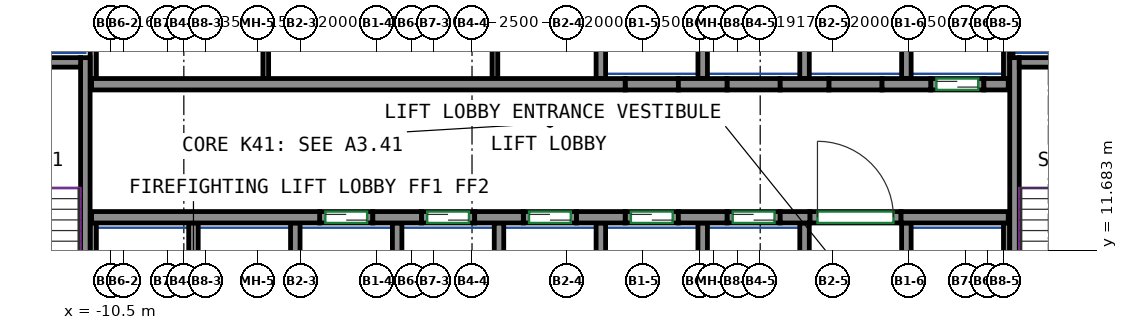
"""IFC4 building model, lengths in metres.
Left out: names, types, materials, properties, quantities, classifications, styles, units other than length and angle.
Written with IfcOpenShell. Run it as: python <this file> out.ifc"""

import sys

from ifc_helpers import new_model, si_unit, direction, frame, frame_2d, origin, place, context, subcontext, project, spatial, rectangle, extrude, source, transform, mapped, element, fill, save


model = new_model("IFC4")
c1 = context("Model", 3, precision=1e-05, world=origin(), true_north=direction((0.0, 1.0)))
c2 = subcontext(c1, "Body", "Model", "MODEL_VIEW")
j1 = project(units=[si_unit("LENGTHUNIT", "METRE"), si_unit("PLANEANGLEUNIT", "RADIAN")], contexts=[c1])
p1 = place(None, origin())
s1 = spatial("IfcSite", under=j1, at=p1, CompositionType="ELEMENT")
p2 = place(p1, origin())
s2 = spatial("IfcBuilding", under=s1, at=p2, CompositionType="ELEMENT")
p3 = place(p2, frame((0.0, 0.0, 171.9)))
s3 = spatial("IfcBuildingStorey", under=s2, at=p3, CompositionType="ELEMENT", Elevation=171.9)
m1 = source(origin(), c2, "Body", "SweptSolid", [
    extrude(rectangle(XDim=7.75, YDim=0.25, at=frame_2d((3.875, 0.0))), origin(), (0.0, 0.0, 1.0), 3.12),
])
p4 = place(p3, frame((-11.175, 9.0, 0.0), z_axis=(0.0, 0.0, 1.0), x_axis=(0.0, 1.0, 0.0)))
e1 = element("IfcWall", 1, at=p4, inside=s3, PredefinedType="SHEAR", context=c2, shape_type="MappedRepresentation", body=[
    mapped(m1, transform((0.0, 0.0, 0.0))),
])
m2 = source(origin(), c2, "Body", "SweptSolid", [
    extrude(rectangle(XDim=3.7, YDim=0.25, at=frame_2d((1.85, 0.0))), origin(), (0.0, 0.0, 1.0), 3.12),
])
p5 = place(p3, frame((-15.0, 16.625, 0.0), z_axis=(0.0, 0.0, 1.0), x_axis=(1.0, 0.0, 0.0)))
e2 = element("IfcWall", 2, at=p5, inside=s3, PredefinedType="SHEAR", context=c2, shape_type="MappedRepresentation", body=[
    mapped(m2, transform((0.0, 0.0, 0.0))),
])
p6 = place(p3, frame((13.275, 9.0, 0.0), z_axis=(0.0, 0.0, 1.0), x_axis=(0.0, 1.0, 0.0)))
e3 = element("IfcWall", 3, at=p6, inside=s3, PredefinedType="SHEAR", context=c2, shape_type="MappedRepresentation", body=[
    mapped(m1, transform((0.0, 0.0, 0.0))),
])
m3 = source(origin(), c2, "Body", "SweptSolid", [
    extrude(rectangle(XDim=3.7, YDim=0.25, at=frame_2d((1.85, 0.0))), origin(), (0.0, 0.0, 1.0), 3.12),
])
p7 = place(p3, frame((13.4, 16.625, 0.0), z_axis=(0.0, 0.0, 1.0), x_axis=(1.0, 0.0, 0.0)))
e4 = element("IfcWall", 4, at=p7, inside=s3, PredefinedType="SHEAR", context=c2, shape_type="MappedRepresentation", body=[
    mapped(m3, transform((0.0, 0.0, 0.0))),
])
m4 = source(origin(), c2, "Body", "SweptSolid", [
    extrude(rectangle(XDim=6.0, YDim=0.3, at=frame_2d((3.0, 0.0))), origin(), (0.0, 0.0, 1.0), 3.12),
])
p8 = place(p3, frame((-11.01, 12.55, 0.0), z_axis=(0.0, 0.0, 1.0), x_axis=(1.0, 0.0, 0.0)))
e5 = element("IfcWall", 5, at=p8, inside=s3, PredefinedType="SHEAR", context=c2, shape_type="MappedRepresentation", body=[
    mapped(m4, transform((0.0, 0.0, 0.0))),
])
m5 = source(origin(), c2, "Body", "SweptSolid", [
    extrude(rectangle(XDim=1.28, YDim=0.3, at=frame_2d((0.64, 0.0))), origin(), (0.0, 0.0, 1.0), 3.12),
])
for number, where, z_axis, x_axis in (
    (6, (-3.61, 12.55, 0.0), (0.0, 0.0, 1.0), (1.0, 0.0, 0.0)),
    (7, (-0.93, 12.55, 0.0), (0.0, 0.0, 1.0), (1.0, 0.0, 0.0)),
    (8, (1.75, 12.55, 0.0), (0.0, 0.0, 1.0), (1.0, 0.0, 0.0)),
    (9, (4.43, 12.55, 0.0), (0.0, 0.0, 1.0), (1.0, 0.0, 0.0)),
):
    element("IfcWall", number, at=place(p3, frame(where, z_axis=z_axis, x_axis=x_axis)), inside=s3, PredefinedType="SHEAR", context=c2, shape_type="MappedRepresentation", body=[
        mapped(m5, transform((0.0, 0.0, 0.0))),
    ])
m6 = source(origin(), c2, "Body", "SweptSolid", [
    extrude(rectangle(XDim=0.78, YDim=0.3, at=frame_2d((0.39, 0.0))), origin(), (0.0, 0.0, 1.0), 3.12),
])
p9 = place(p3, frame((7.11, 12.55, 0.0), z_axis=(0.0, 0.0, 1.0), x_axis=(1.0, 0.0, 0.0)))
e10 = element("IfcWall", 10, at=p9, inside=s3, PredefinedType="SHEAR", context=c2, shape_type="MappedRepresentation", body=[
    mapped(m6, transform((0.0, 0.0, 0.0))),
])
m7 = source(origin(), c2, "Body", "SweptSolid", [
    extrude(rectangle(XDim=2.82, YDim=0.3, at=frame_2d((1.41, 0.0))), origin(), (0.0, 0.0, 1.0), 3.12),
])
p10 = place(p3, frame((10.29, 12.55, 0.0), z_axis=(0.0, 0.0, 1.0), x_axis=(1.0, 0.0, 0.0)))
e11 = element("IfcWall", 11, at=p10, inside=s3, PredefinedType="SHEAR", context=c2, shape_type="MappedRepresentation", body=[
    mapped(m7, transform((0.0, 0.0, 0.0))),
])
m8 = source(origin(), c2, "Body", "SweptSolid", [
    extrude(rectangle(XDim=14.04, YDim=0.3, at=frame_2d((7.02, 0.0))), origin(), (0.0, 0.0, 1.0), 3.12),
])
p11 = place(p3, frame((-11.01, 16.05, 0.0), z_axis=(0.0, 0.0, 1.0), x_axis=(1.0, 0.0, 0.0)))
e12 = element("IfcWall", 12, at=p11, inside=s3, PredefinedType="SHEAR", context=c2, shape_type="MappedRepresentation", body=[
    mapped(m8, transform((0.0, 0.0, 0.0))),
])
p12 = place(p3, frame((4.43, 16.05, 0.0), z_axis=(0.0, 0.0, 1.0), x_axis=(1.0, 0.0, 0.0)))
e13 = element("IfcWall", 13, at=p12, inside=s3, PredefinedType="SHEAR", context=c2, shape_type="MappedRepresentation", body=[
    mapped(m5, transform((0.0, 0.0, 0.0))),
])
m9 = source(origin(), c2, "Body", "SweptSolid", [
    extrude(rectangle(XDim=1.28, YDim=0.3, at=frame_2d((0.64, 0.0))), origin(), (0.0, 0.0, 1.0), 3.12),
])
p13 = place(p3, frame((7.11, 16.05, 0.0), z_axis=(0.0, 0.0, 1.0), x_axis=(1.0, 0.0, 0.0)))
e14 = element("IfcWall", 14, at=p13, inside=s3, PredefinedType="SHEAR", context=c2, shape_type="MappedRepresentation", body=[
    mapped(m9, transform((0.0, 0.0, 0.0))),
])
p14 = place(p3, frame((9.79, 16.05, 0.0), z_axis=(0.0, 0.0, 1.0), x_axis=(1.0, 0.0, 0.0)))
e15 = element("IfcWall", 15, at=p14, inside=s3, PredefinedType="SHEAR", context=c2, shape_type="MappedRepresentation", body=[
    mapped(m5, transform((0.0, 0.0, 0.0))),
])
m10 = source(origin(), c2, "Body", "SweptSolid", [
    extrude(rectangle(XDim=0.64, YDim=0.3, at=frame_2d((0.32, 0.0))), origin(), (0.0, 0.0, 1.0), 3.12),
])
p15 = place(p3, frame((12.47, 16.05, 0.0), z_axis=(0.0, 0.0, 1.0), x_axis=(1.0, 0.0, 0.0)))
e16 = element("IfcWall", 16, at=p15, inside=s3, PredefinedType="SHEAR", context=c2, shape_type="MappedRepresentation", body=[
    mapped(m10, transform((0.0, 0.0, 0.0))),
])
m11 = source(origin(), c2, "Body", "SweptSolid", [
    extrude(rectangle(XDim=1.4, YDim=0.3, at=frame_2d((0.7, 0.0))), origin(), (0.0, 0.0, 1.0), 3.12),
])
p16 = place(p3, frame((-5.01, 12.55, 0.0), z_axis=(0.0, 0.0, 1.0), x_axis=(1.0, 0.0, 0.0)))
e17 = element("IfcWall", 17, at=p16, inside=s3, PredefinedType="PARTITIONING", context=c2, shape_type="MappedRepresentation", body=[
    mapped(m11, transform((0.0, 0.0, 0.0))),
])
p17 = place(p16, frame((0.15, 0.0, 0.0)))
e18 = element("IfcOpeningElement", 18, at=p17, cuts=e17, PredefinedType="OPENING", context=c2, shape_type="SweptSolid", body=[
    extrude(rectangle(XDim=1.1, YDim=2.1, at=frame_2d((0.55, 1.05))), frame((0.0, 0.16, 0.0), z_axis=(0.0, -1.0, 0.0), x_axis=(1.0, 0.0, 0.0)), (0.0, 0.0, 1.0), 0.32),
])
m12 = source(origin(), c2, "Body", "SweptSolid", [
    extrude(rectangle(XDim=1.4, YDim=0.3, at=frame_2d((0.7, 0.0))), origin(), (0.0, 0.0, 1.0), 3.12),
])
p18 = place(p3, frame((-2.33, 12.55, 0.0), z_axis=(0.0, 0.0, 1.0), x_axis=(1.0, 0.0, 0.0)))
e19 = element("IfcWall", 19, at=p18, inside=s3, PredefinedType="PARTITIONING", context=c2, shape_type="MappedRepresentation", body=[
    mapped(m12, transform((0.0, 0.0, 0.0))),
])
p19 = place(p18, frame((0.15, 0.0, 0.0)))
e20 = element("IfcOpeningElement", 20, at=p19, cuts=e19, PredefinedType="OPENING", context=c2, shape_type="SweptSolid", body=[
    extrude(rectangle(XDim=1.1, YDim=2.1, at=frame_2d((0.55, 1.05))), frame((0.0, 0.16, 0.0), z_axis=(0.0, -1.0, 0.0), x_axis=(1.0, 0.0, 0.0)), (0.0, 0.0, 1.0), 0.32),
])
p20 = place(p3, frame((0.35, 12.55, 0.0), z_axis=(0.0, 0.0, 1.0), x_axis=(1.0, 0.0, 0.0)))
e21 = element("IfcWall", 21, at=p20, inside=s3, PredefinedType="PARTITIONING", context=c2, shape_type="MappedRepresentation", body=[
    mapped(m11, transform((0.0, 0.0, 0.0))),
])
p21 = place(p20, frame((0.15, 0.0, 0.0)))
e22 = element("IfcOpeningElement", 22, at=p21, cuts=e21, PredefinedType="OPENING", context=c2, shape_type="SweptSolid", body=[
    extrude(rectangle(XDim=1.1, YDim=2.1, at=frame_2d((0.55, 1.05))), frame((0.0, 0.16, 0.0), z_axis=(0.0, -1.0, 0.0), x_axis=(1.0, 0.0, 0.0)), (0.0, 0.0, 1.0), 0.32),
])
p22 = place(p3, frame((3.03, 12.55, 0.0), z_axis=(0.0, 0.0, 1.0), x_axis=(1.0, 0.0, 0.0)))
e23 = element("IfcWall", 23, at=p22, inside=s3, PredefinedType="PARTITIONING", context=c2, shape_type="MappedRepresentation", body=[
    mapped(m11, transform((0.0, 0.0, 0.0))),
])
p23 = place(p22, frame((0.15, 0.0, 0.0)))
e24 = element("IfcOpeningElement", 24, at=p23, cuts=e23, PredefinedType="OPENING", context=c2, shape_type="SweptSolid", body=[
    extrude(rectangle(XDim=1.1, YDim=2.1, at=frame_2d((0.55, 1.05))), frame((0.0, 0.16, 0.0), z_axis=(0.0, -1.0, 0.0), x_axis=(1.0, 0.0, 0.0)), (0.0, 0.0, 1.0), 0.32),
])
p24 = place(p3, frame((5.71, 12.55, 0.0), z_axis=(0.0, 0.0, 1.0), x_axis=(1.0, 0.0, 0.0)))
e25 = element("IfcWall", 25, at=p24, inside=s3, PredefinedType="PARTITIONING", context=c2, shape_type="MappedRepresentation", body=[
    mapped(m12, transform((0.0, 0.0, 0.0))),
])
p25 = place(p24, frame((0.15, 0.0, 0.0)))
e26 = element("IfcOpeningElement", 26, at=p25, cuts=e25, PredefinedType="OPENING", context=c2, shape_type="SweptSolid", body=[
    extrude(rectangle(XDim=1.1, YDim=2.1, at=frame_2d((0.55, 1.05))), frame((0.0, 0.16, 0.0), z_axis=(0.0, -1.0, 0.0), x_axis=(1.0, 0.0, 0.0)), (0.0, 0.0, 1.0), 0.32),
])
p26 = place(p3, frame((11.07, 16.05, 0.0), z_axis=(0.0, 0.0, 1.0), x_axis=(1.0, 0.0, 0.0)))
e27 = element("IfcWall", 27, at=p26, inside=s3, PredefinedType="PARTITIONING", context=c2, shape_type="MappedRepresentation", body=[
    mapped(m11, transform((0.0, 0.0, 0.0))),
])
p27 = place(p26, frame((0.15, 0.0, 0.0)))
e28 = element("IfcOpeningElement", 28, at=p27, cuts=e27, PredefinedType="OPENING", context=c2, shape_type="SweptSolid", body=[
    extrude(rectangle(XDim=1.1, YDim=2.1, at=frame_2d((0.55, 1.05))), frame((0.0, 0.16, 0.0), z_axis=(0.0, -1.0, 0.0), x_axis=(1.0, 0.0, 0.0)), (0.0, 0.0, 1.0), 0.32),
])
m13 = source(origin(), c2, "Body", "SweptSolid", [
    extrude(rectangle(XDim=2.4, YDim=0.3, at=frame_2d((1.2, 0.0))), origin(), (0.0, 0.0, 1.0), 3.12),
])
p28 = place(p3, frame((7.89, 12.55, 0.0), z_axis=(0.0, 0.0, 1.0), x_axis=(1.0, 0.0, 0.0)))
e29 = element("IfcWall", 29, at=p28, inside=s3, PredefinedType="PARTITIONING", context=c2, shape_type="MappedRepresentation", body=[
    mapped(m13, transform((0.0, 0.0, 0.0))),
])
p29 = place(p28, frame((0.2, 0.0, 0.0)))
e30 = element("IfcOpeningElement", 30, at=p29, cuts=e29, PredefinedType="OPENING", context=c2, shape_type="SweptSolid", body=[
    extrude(rectangle(XDim=2.0, YDim=2.1, at=frame_2d((1.0, 1.05))), frame((0.0, 0.16, 0.0), z_axis=(0.0, -1.0, 0.0), x_axis=(1.0, 0.0, 0.0)), (0.0, 0.0, 1.0), 0.32),
])
p30 = place(p3, frame((3.03, 16.05, 0.0), z_axis=(0.0, 0.0, 1.0), x_axis=(1.0, 0.0, 0.0)))
e31 = element("IfcWall", 31, at=p30, inside=s3, PredefinedType="PARTITIONING", context=c2, shape_type="MappedRepresentation", body=[
    mapped(m11, transform((0.0, 0.0, 0.0))),
])
for number, where, z_axis, x_axis in (
    (32, (5.71, 16.05, 0.0), (0.0, 0.0, 1.0), (1.0, 0.0, 0.0)),
    (33, (8.39, 16.05, 0.0), (0.0, 0.0, 1.0), (1.0, 0.0, 0.0)),
):
    element("IfcWall", number, at=place(p3, frame(where, z_axis=z_axis, x_axis=x_axis)), inside=s3, PredefinedType="PARTITIONING", context=c2, shape_type="MappedRepresentation", body=[
        mapped(m12, transform((0.0, 0.0, 0.0))),
    ])
m14 = source(origin(), c2, "Body", "SweptSolid", [
    extrude(rectangle(XDim=3.275, YDim=0.165, at=frame_2d((1.638, 0.0))), origin(), (0.0, 0.0, 1.0), 3.12),
])
p31 = place(p3, frame((13.067, 16.2, 0.0), z_axis=(0.0, 0.0, 1.0), x_axis=(0.0, 1.0, 0.0)))
e34 = element("IfcWall", 34, at=p31, inside=s3, PredefinedType="PARTITIONING", context=c2, shape_type="MappedRepresentation", body=[
    mapped(m14, transform((0.0, 0.0, 0.0))),
])
m15 = source(origin(), c2, "Body", "SweptSolid", [
    extrude(rectangle(XDim=4.8, YDim=0.165, at=frame_2d((2.4, 0.0))), origin(), (0.0, 0.0, 1.0), 3.12),
])
p32 = place(p3, frame((-10.968, 16.2, 0.0), z_axis=(0.0, 0.0, 1.0), x_axis=(0.0, 1.0, 0.0)))
e35 = element("IfcWall", 35, at=p32, inside=s3, PredefinedType="PARTITIONING", context=c2, shape_type="MappedRepresentation", body=[
    mapped(m15, transform((0.0, 0.0, 0.0))),
])
m16 = source(origin(), c2, "Body", "SweptSolid", [
    extrude(rectangle(XDim=3.275, YDim=0.25, at=frame_2d((1.638, 0.0))), origin(), (0.0, 0.0, 1.0), 3.12),
])
p33 = place(p3, frame((10.43, 16.2, 0.0), z_axis=(0.0, 0.0, 1.0), x_axis=(0.0, 1.0, 0.0)))
e36 = element("IfcWall", 36, at=p33, inside=s3, PredefinedType="PARTITIONING", context=c2, shape_type="MappedRepresentation", body=[
    mapped(m16, transform((0.0, 0.0, 0.0))),
])
m17 = source(origin(), c2, "Body", "SweptSolid", [
    extrude(rectangle(XDim=2.725, YDim=0.085, at=frame_2d((1.363, 0.0))), origin(), (0.0, 0.0, 1.0), 3.12),
])
p34 = place(p3, frame((13.192, 16.75, 0.0), z_axis=(0.0, 0.0, 1.0), x_axis=(0.0, 1.0, 0.0)))
e37 = element("IfcWall", 37, at=p34, inside=s3, PredefinedType="PARTITIONING", context=c2, shape_type="MappedRepresentation", body=[
    mapped(m17, transform((0.0, 0.0, 0.0))),
])
for number, where, z_axis, x_axis in (
    (38, (2.39, 16.2, 0.0), (0.0, 0.0, 1.0), (0.0, 1.0, 0.0)),
    (39, (5.07, 16.2, 0.0), (0.0, 0.0, 1.0), (0.0, 1.0, 0.0)),
    (40, (7.75, 16.2, 0.0), (0.0, 0.0, 1.0), (0.0, 1.0, 0.0)),
):
    element("IfcWall", number, at=place(p3, frame(where, z_axis=z_axis, x_axis=x_axis)), inside=s3, PredefinedType="PARTITIONING", context=c2, shape_type="MappedRepresentation", body=[
        mapped(m16, transform((0.0, 0.0, 0.0))),
    ])
m18 = source(origin(), c2, "Body", "SweptSolid", [
    extrude(rectangle(XDim=3.4, YDim=0.25, at=frame_2d((1.7, 0.0))), origin(), (0.0, 0.0, 1.0), 3.12),
])
p35 = place(p3, frame((10.43, 9.0, 0.0), z_axis=(0.0, 0.0, 1.0), x_axis=(0.0, 1.0, 0.0)))
e41 = element("IfcWall", 41, at=p35, inside=s3, PredefinedType="PARTITIONING", context=c2, shape_type="MappedRepresentation", body=[
    mapped(m18, transform((0.0, 0.0, 0.0))),
])
m19 = source(origin(), c2, "Body", "SweptSolid", [
    extrude(rectangle(XDim=3.4, YDim=0.165, at=frame_2d((1.7, 0.0))), origin(), (0.0, 0.0, 1.0), 3.12),
])
p36 = place(p3, frame((13.067, 9.0, 0.0), z_axis=(0.0, 0.0, 1.0), x_axis=(0.0, 1.0, 0.0)))
e42 = element("IfcWall", 42, at=p36, inside=s3, PredefinedType="PARTITIONING", context=c2, shape_type="MappedRepresentation", body=[
    mapped(m19, transform((0.0, 0.0, 0.0))),
])
for number, where, z_axis, x_axis in (
    (43, (2.39, 9.0, 0.0), (0.0, 0.0, 1.0), (0.0, 1.0, 0.0)),
    (44, (5.07, 9.0, 0.0), (0.0, 0.0, 1.0), (0.0, 1.0, 0.0)),
    (45, (7.75, 9.0, 0.0), (0.0, 0.0, 1.0), (0.0, 1.0, 0.0)),
    (46, (-0.29, 9.0, 0.0), (0.0, 0.0, 1.0), (0.0, 1.0, 0.0)),
):
    element("IfcWall", number, at=place(p3, frame(where, z_axis=z_axis, x_axis=x_axis)), inside=s3, PredefinedType="PARTITIONING", context=c2, shape_type="MappedRepresentation", body=[
        mapped(m18, transform((0.0, 0.0, 0.0))),
    ])
p37 = place(p3, frame((-10.968, 9.0, 0.0), z_axis=(0.0, 0.0, 1.0), x_axis=(0.0, 1.0, 0.0)))
e47 = element("IfcWall", 47, at=p37, inside=s3, PredefinedType="PARTITIONING", context=c2, shape_type="MappedRepresentation", body=[
    mapped(m19, transform((0.0, 0.0, 0.0))),
])
for number, where, z_axis, x_axis in (
    (48, (-2.97, 9.0, 0.0), (0.0, 0.0, 1.0), (0.0, 1.0, 0.0)),
    (49, (-5.65, 9.0, 0.0), (0.0, 0.0, 1.0), (0.0, 1.0, 0.0)),
    (50, (-8.33, 9.0, 0.0), (0.0, 0.0, 1.0), (0.0, 1.0, 0.0)),
):
    element("IfcWall", number, at=place(p3, frame(where, z_axis=z_axis, x_axis=x_axis)), inside=s3, PredefinedType="PARTITIONING", context=c2, shape_type="MappedRepresentation", body=[
        mapped(m18, transform((0.0, 0.0, 0.0))),
    ])
m20 = source(origin(), c2, "Body", "SweptSolid", [
    extrude(rectangle(XDim=4.8, YDim=0.15, at=frame_2d((2.4, 0.0))), origin(), (0.0, 0.0, 1.0), 3.12),
])
for number, where, z_axis, x_axis in (
    (51, (-6.427, 16.2, 0.0), (0.0, 0.0, 1.0), (0.0, 1.0, 0.0)),
    (52, (-0.397, 16.2, 0.0), (0.0, 0.0, 1.0), (0.0, 1.0, 0.0)),
):
    element("IfcWall", number, at=place(p3, frame(where, z_axis=z_axis, x_axis=x_axis)), inside=s3, PredefinedType="PARTITIONING", context=c2, shape_type="MappedRepresentation", body=[
        mapped(m20, transform((0.0, 0.0, 0.0))),
    ])
p38 = place(p29, origin())
e53 = element("IfcDoor", 53, at=p38, inside=s3, OperationType="DOUBLE_DOOR_SINGLE_SWING", PredefinedType="DOOR", context=c2, shape_type="SweptSolid", body=[
    extrude(rectangle(XDim=2.0, YDim=2.1, at=frame_2d((1.0, 1.05))), frame((0.0, 0.025, 0.0), z_axis=(0.0, -1.0, 0.0), x_axis=(1.0, 0.0, 0.0)), (0.0, 0.0, 1.0), 0.05),
])
fill(e30, e53)
p39 = place(p17, origin())
e54 = element("IfcDoor", 54, at=p39, inside=s3, OperationType="DOUBLE_DOOR_SLIDING", PredefinedType="DOOR", context=c2, shape_type="SweptSolid", body=[
    extrude(rectangle(XDim=1.1, YDim=2.1, at=frame_2d((0.55, 1.05))), frame((0.0, 0.025, 0.0), z_axis=(0.0, -1.0, 0.0), x_axis=(1.0, 0.0, 0.0)), (0.0, 0.0, 1.0), 0.05),
])
fill(e18, e54)
p40 = place(p19, origin())
e55 = element("IfcDoor", 55, at=p40, inside=s3, OperationType="DOUBLE_DOOR_SLIDING", PredefinedType="DOOR", context=c2, shape_type="SweptSolid", body=[
    extrude(rectangle(XDim=1.1, YDim=2.1, at=frame_2d((0.55, 1.05))), frame((0.0, 0.025, 0.0), z_axis=(0.0, -1.0, 0.0), x_axis=(1.0, 0.0, 0.0)), (0.0, 0.0, 1.0), 0.05),
])
fill(e20, e55)
p41 = place(p21, origin())
e56 = element("IfcDoor", 56, at=p41, inside=s3, OperationType="DOUBLE_DOOR_SLIDING", PredefinedType="DOOR", context=c2, shape_type="SweptSolid", body=[
    extrude(rectangle(XDim=1.1, YDim=2.1, at=frame_2d((0.55, 1.05))), frame((0.0, 0.025, 0.0), z_axis=(0.0, -1.0, 0.0), x_axis=(1.0, 0.0, 0.0)), (0.0, 0.0, 1.0), 0.05),
])
fill(e22, e56)
p42 = place(p23, origin())
e57 = element("IfcDoor", 57, at=p42, inside=s3, OperationType="DOUBLE_DOOR_SLIDING", PredefinedType="DOOR", context=c2, shape_type="SweptSolid", body=[
    extrude(rectangle(XDim=1.1, YDim=2.1, at=frame_2d((0.55, 1.05))), frame((0.0, 0.025, 0.0), z_axis=(0.0, -1.0, 0.0), x_axis=(1.0, 0.0, 0.0)), (0.0, 0.0, 1.0), 0.05),
])
fill(e24, e57)
p43 = place(p25, origin())
e58 = element("IfcDoor", 58, at=p43, inside=s3, OperationType="DOUBLE_DOOR_SLIDING", PredefinedType="DOOR", context=c2, shape_type="SweptSolid", body=[
    extrude(rectangle(XDim=1.1, YDim=2.1, at=frame_2d((0.55, 1.05))), frame((0.0, 0.025, 0.0), z_axis=(0.0, -1.0, 0.0), x_axis=(1.0, 0.0, 0.0)), (0.0, 0.0, 1.0), 0.05),
])
fill(e26, e58)
p44 = place(p27, origin())
e59 = element("IfcDoor", 59, at=p44, inside=s3, OperationType="DOUBLE_DOOR_SLIDING", PredefinedType="DOOR", context=c2, shape_type="SweptSolid", body=[
    extrude(rectangle(XDim=1.1, YDim=2.1, at=frame_2d((0.55, 1.05))), frame((0.0, 0.025, 0.0), z_axis=(0.0, -1.0, 0.0), x_axis=(1.0, 0.0, 0.0)), (0.0, 0.0, 1.0), 0.05),
])
fill(e28, e59)
save(model, sys.argv[1])
